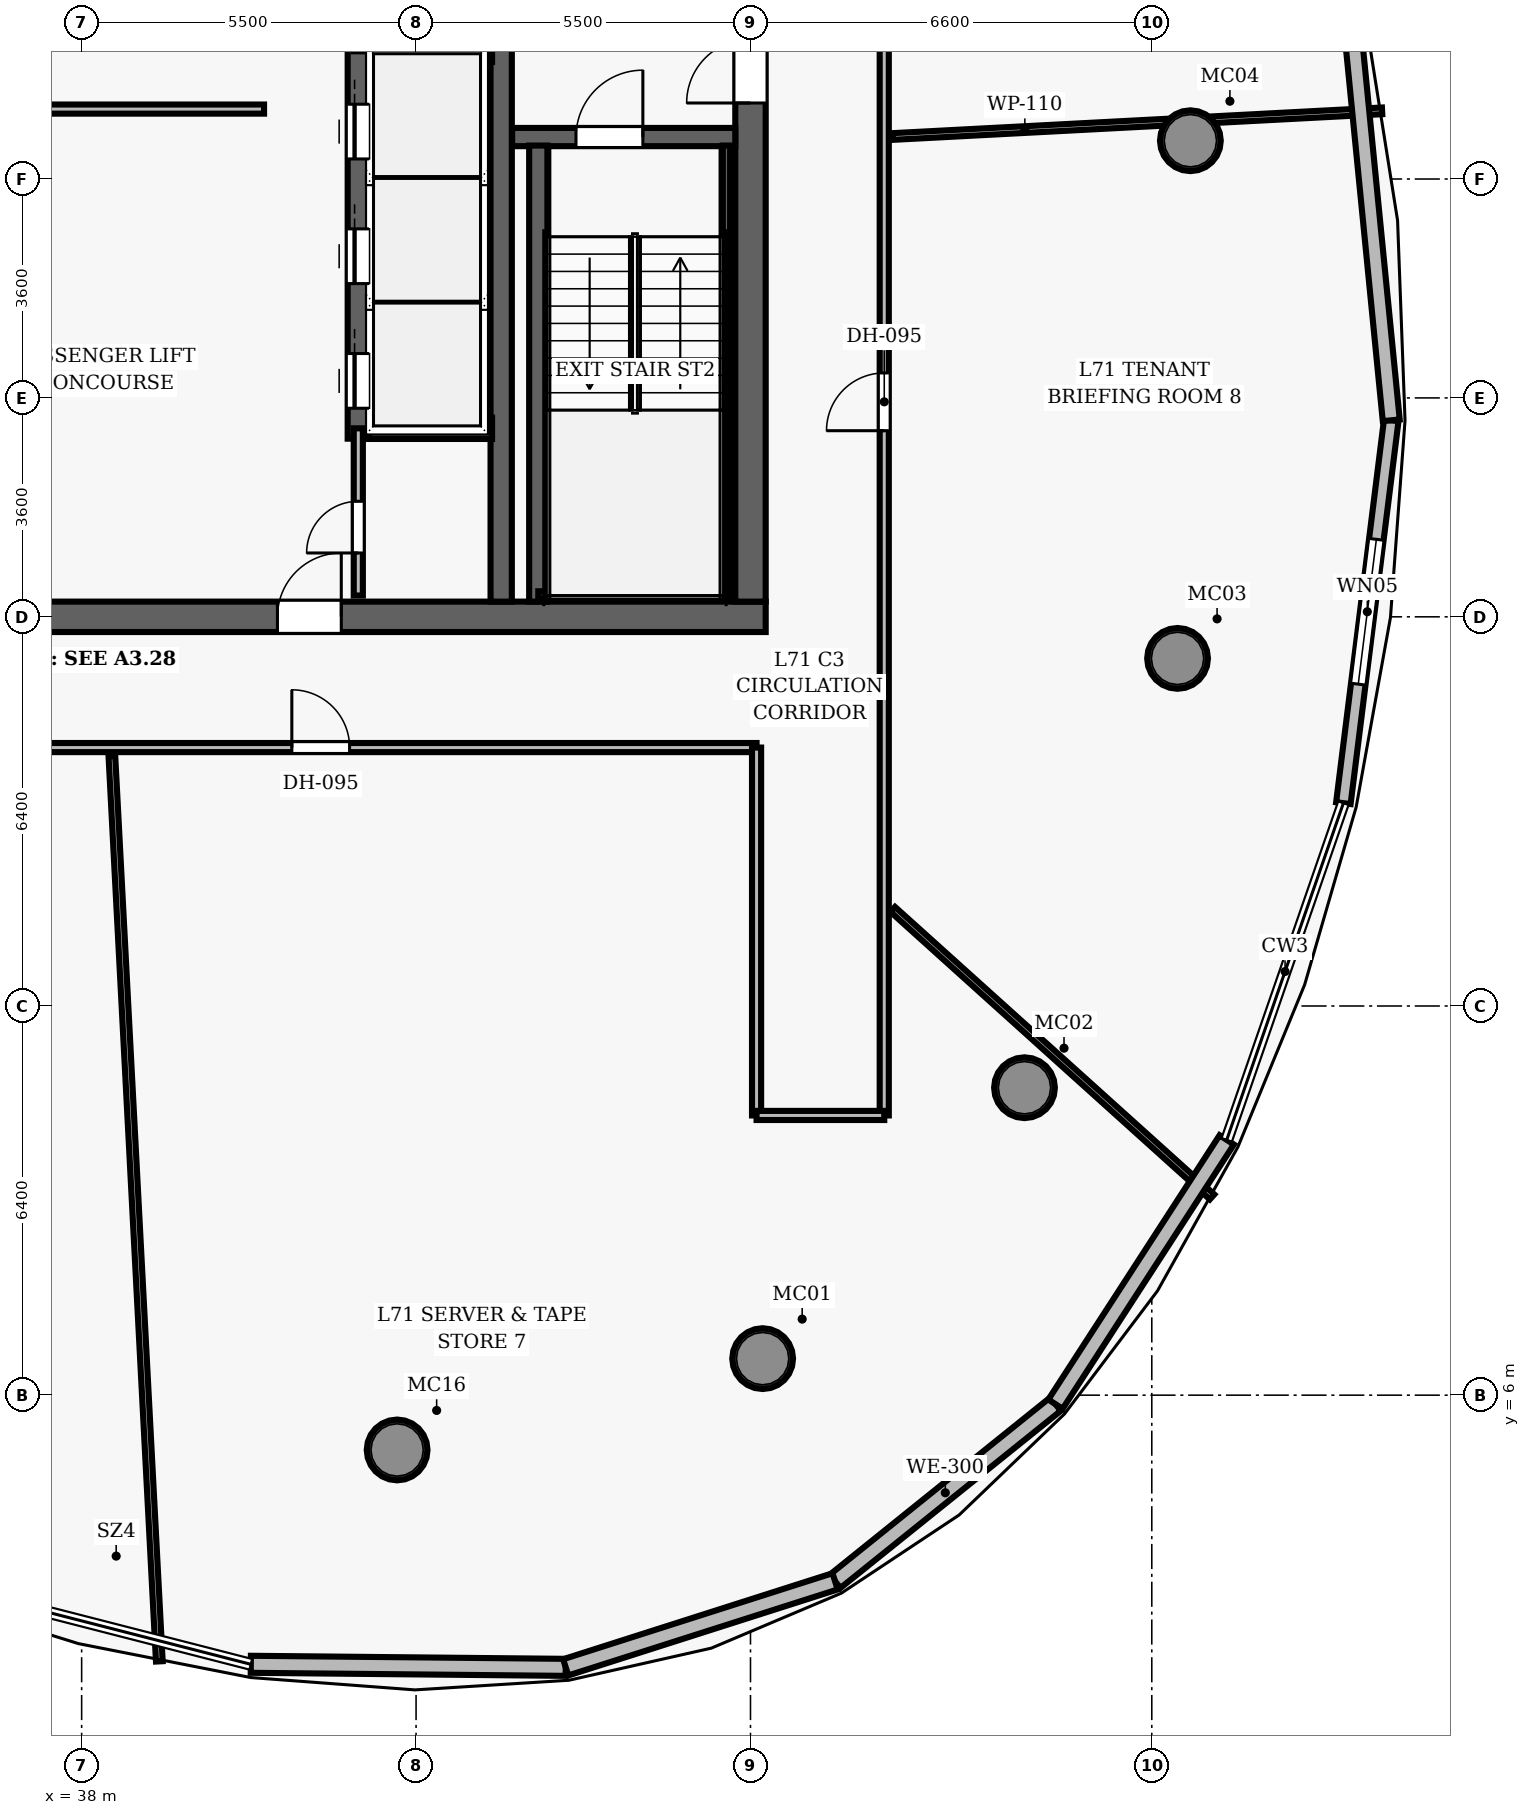
"""IFC4 building model, lengths in metres.
Left out: names, types, materials, properties, quantities, classifications, styles, units other than length and angle.
Written with IfcOpenShell. Run it as: python <this file> out.ifc"""

import sys

from ifc_helpers import new_model, si_unit, direction, frame, frame_2d, origin, origin_2d, place, context, subcontext, project, spatial, rectangle, hollow_circle, extrude, element, fill, save


model = new_model("IFC4")
c1 = context("Model", 3, precision=1e-05, world=origin(), true_north=direction((0.0, 1.0)))
c2 = subcontext(c1, "Body", "Model", "MODEL_VIEW")
j1 = project(units=[si_unit("LENGTHUNIT", "METRE"), si_unit("PLANEANGLEUNIT", "RADIAN")], contexts=[c1])
p1 = place(None, origin())
s1 = spatial("IfcSite", under=j1, at=p1, CompositionType="ELEMENT")
p2 = place(p1, origin())
s2 = spatial("IfcBuilding", under=s1, at=p2, CompositionType="ELEMENT")
p3 = place(p2, frame((0.0, 0.0, 280.55)))
s3 = spatial("IfcBuildingStorey", under=s2, at=p3, CompositionType="ELEMENT", Elevation=280.55)
p4 = place(p3, frame((26.75, 18.8, 0.0), z_axis=(0.0, 0.0, 1.0), x_axis=(1.0, 0.0, 0.0)))
e1 = element("IfcWall", 1, at=p4, inside=s3, PredefinedType="SHEAR", context=c2, shape_type="SweptSolid", body=[
    extrude(rectangle(XDim=22.5, YDim=0.5, at=frame_2d((11.25, 0.0))), origin(), (0.0, 0.0, 1.0), 3.85),
])
p5 = place(p4, frame((14.47, 0.0, 0.0)))
e2 = element("IfcOpeningElement", 2, at=p5, cuts=e1, PredefinedType="OPENING", context=c2, shape_type="SweptSolid", body=[
    extrude(rectangle(XDim=1.05, YDim=2.15, at=frame_2d((0.525, 1.075))), frame((0.0, 0.26, 0.0), z_axis=(0.0, -1.0, 0.0), x_axis=(1.0, 0.0, 0.0)), (0.0, 0.0, 1.0), 0.52),
])
p6 = place(p3, frame((49.0, 19.05, 0.0), z_axis=(0.0, 0.0, 1.0), x_axis=(0.0, 1.0, 0.0)))
e3 = element("IfcWall", 3, at=p6, inside=s3, PredefinedType="SHEAR", context=c2, shape_type="SweptSolid", body=[
    extrude(rectangle(XDim=13.9, YDim=0.5, at=frame_2d((6.95, 0.0))), origin(), (0.0, 0.0, 1.0), 3.85),
])
p7 = place(p6, frame((8.2, 0.0, 0.0)))
e4 = element("IfcOpeningElement", 4, at=p7, cuts=e3, PredefinedType="OPENING", context=c2, shape_type="SweptSolid", body=[
    extrude(rectangle(XDim=1.05, YDim=2.15, at=frame_2d((0.525, 1.075))), frame((0.0, 0.26, 0.0), z_axis=(0.0, -1.0, 0.0), x_axis=(1.0, 0.0, 0.0)), (0.0, 0.0, 1.0), 0.52),
])
p8 = place(p3, frame((44.9, 19.05, 0.0), z_axis=(0.0, 0.0, 1.0), x_axis=(0.0, 1.0, 0.0)))
e5 = element("IfcWall", 5, at=p8, inside=s3, PredefinedType="SHEAR", context=c2, shape_type="SweptSolid", body=[
    extrude(rectangle(XDim=13.9, YDim=0.35, at=frame_2d((6.95, 0.0))), origin(), (0.0, 0.0, 1.0), 3.85),
])
for number, where, z_axis, x_axis in (
    (6, (49.2, 6.601, 0.0), (0.0, 0.0, 1.0), (1.0, 0.0, 0.0)),
    (7, (53.506, 11.056, 0.0), (0.0, 0.0, 1.0), (1.0, 0.0, 0.0)),
    (8, (56.024, 18.116, 0.0), (0.0, 0.0, 1.0), (1.0, 0.0, 0.0)),
    (9, (56.235, 26.629, 0.0), (0.0, 0.0, 1.0), (1.0, 0.0, 0.0)),
    (10, (43.188, 5.099, 0.0), (0.0, 0.0, 1.0), (1.0, 0.0, 0.0)),
):
    element("IfcColumn", number, at=place(p3, frame(where, z_axis=z_axis, x_axis=x_axis)), inside=s3, PredefinedType="COLUMN", context=c2, shape_type="SweptSolid", body=[
        extrude(hollow_circle(Radius=0.5, WallThickness=0.045, at=origin_2d()), origin(), (0.0, 0.0, 1.0), 3.85),
    ])
p9 = place(p3, frame((45.08, 26.69, 0.0), z_axis=(0.0, 0.0, 1.0), x_axis=(1.0, 0.0, 0.0)))
e11 = element("IfcWall", 11, at=p9, inside=s3, PredefinedType="SHEAR", context=c2, shape_type="SweptSolid", body=[
    extrude(rectangle(XDim=3.67, YDim=0.3, at=frame_2d((1.835, 0.0))), origin(), (0.0, 0.0, 1.0), 3.85),
])
p10 = place(p9, frame((1.05, 0.0, 0.0)))
e12 = element("IfcOpeningElement", 12, at=p10, cuts=e11, PredefinedType="OPENING", context=c2, shape_type="SweptSolid", body=[
    extrude(rectangle(XDim=1.1, YDim=2.15, at=frame_2d((0.55, 1.075))), frame((0.0, 0.16, 0.0), z_axis=(0.0, -1.0, 0.0), x_axis=(1.0, 0.0, 0.0)), (0.0, 0.0, 1.0), 0.32),
])
p11 = place(p3, frame((45.51, 19.05, 0.0), z_axis=(0.0, 0.0, 1.0), x_axis=(0.0, 1.0, 0.0)))
e13 = element("IfcWall", 13, at=p11, inside=s3, PredefinedType="SHEAR", context=c2, shape_type="SweptSolid", body=[
    extrude(rectangle(XDim=7.5, YDim=0.3, at=frame_2d((3.75, 0.0))), origin(), (0.0, 0.0, 1.0), 3.85),
])
p12 = place(p3, frame((48.605, 19.1, 0.0), z_axis=(0.0, 0.0, 1.0), x_axis=(0.0, 1.0, 0.0)))
e14 = element("IfcWall", 14, at=p12, inside=s3, PredefinedType="SHEAR", context=c2, shape_type="SweptSolid", body=[
    extrude(rectangle(XDim=7.45, YDim=0.12, at=frame_2d((3.725, 0.0))), origin(), (0.0, 0.0, 1.0), 3.85),
])
p13 = place(p3, frame((45.51, 19.16, 0.0), z_axis=(0.0, 0.0, 1.0), x_axis=(1.0, 0.0, 0.0)))
e15 = element("IfcWall", 15, at=p13, inside=s3, PredefinedType="SHEAR", context=c2, shape_type="SweptSolid", body=[
    extrude(rectangle(XDim=3.095, YDim=0.12, at=frame_2d((1.547, 0.0))), origin(), (0.0, 0.0, 1.0), 3.85),
])
p14 = place(p3, frame((42.55, 21.73, 0.0), z_axis=(0.0, 0.0, 1.0), x_axis=(0.0, 1.0, 0.0)))
e16 = element("IfcWall", 16, at=p14, inside=s3, PredefinedType="SHEAR", context=c2, shape_type="SweptSolid", body=[
    extrude(rectangle(XDim=6.54, YDim=0.35, at=frame_2d((3.27, 0.0))), origin(), (0.0, 0.0, 1.0), 3.04),
])
p15 = place(p14, frame((0.5, 0.0, 0.0)))
e17 = element("IfcOpeningElement", 17, at=p15, cuts=e16, PredefinedType="OPENING", context=c2, shape_type="SweptSolid", body=[
    extrude(rectangle(XDim=0.9, YDim=2.15, at=frame_2d((0.45, 1.075))), frame((0.0, 0.185, 0.0), z_axis=(0.0, -1.0, 0.0), x_axis=(1.0, 0.0, 0.0)), (0.0, 0.0, 1.0), 0.37),
])
p16 = place(p14, frame((2.55, 0.0, 0.0)))
e18 = element("IfcOpeningElement", 18, at=p16, cuts=e16, PredefinedType="OPENING", context=c2, shape_type="SweptSolid", body=[
    extrude(rectangle(XDim=0.9, YDim=2.15, at=frame_2d((0.45, 1.075))), frame((0.0, 0.185, 0.0), z_axis=(0.0, -1.0, 0.0), x_axis=(1.0, 0.0, 0.0)), (0.0, 0.0, 1.0), 0.37),
])
p17 = place(p14, frame((4.6, 0.0, 0.0)))
e19 = element("IfcOpeningElement", 19, at=p17, cuts=e16, PredefinedType="OPENING", context=c2, shape_type="SweptSolid", body=[
    extrude(rectangle(XDim=0.9, YDim=2.15, at=frame_2d((0.45, 1.075))), frame((0.0, 0.185, 0.0), z_axis=(0.0, -1.0, 0.0), x_axis=(1.0, 0.0, 0.0)), (0.0, 0.0, 1.0), 0.37),
])
for number, where, z_axis, x_axis in (
    (20, (42.72, 21.9, 0.0), (0.0, 0.0, 1.0), (1.0, 0.0, 0.0)),
    (21, (42.72, 28.1, 0.0), (0.0, 0.0, 1.0), (1.0, 0.0, 0.0)),
):
    element("IfcWall", number, at=place(p3, frame(where, z_axis=z_axis, x_axis=x_axis)), inside=s3, PredefinedType="SHEAR", context=c2, shape_type="SweptSolid", body=[
        extrude(rectangle(XDim=2.03, YDim=0.35, at=frame_2d((1.015, 0.0))), origin(), (0.0, 0.0, 1.0), 3.04),
    ])
p18 = place(p3, frame((34.64, 27.15, 0.0), z_axis=(0.0, 0.0, 1.0), x_axis=(1.0, 0.0, 0.0)))
e22 = element("IfcWall", 22, at=p18, inside=s3, PredefinedType="PARTITIONING", context=c2, shape_type="SweptSolid", body=[
    extrude(rectangle(XDim=6.36, YDim=0.15, at=frame_2d((3.18, 0.0))), origin(), (0.0, 0.0, 1.0), 3.04),
])
p19 = place(p3, frame((42.55, 19.15, 0.0), z_axis=(0.0, 0.0, 1.0), x_axis=(0.0, 1.0, 0.0)))
e23 = element("IfcWall", 23, at=p19, inside=s3, PredefinedType="PARTITIONING", context=c2, shape_type="SweptSolid", body=[
    extrude(rectangle(XDim=2.75, YDim=0.15, at=frame_2d((1.375, 0.0))), origin(), (0.0, 0.0, 1.0), 3.04),
])
p20 = place(p19, frame((0.7, 0.0, 0.0)))
e24 = element("IfcOpeningElement", 24, at=p20, cuts=e23, PredefinedType="OPENING", context=c2, shape_type="SweptSolid", body=[
    extrude(rectangle(XDim=0.85, YDim=2.1, at=frame_2d((0.425, 1.05))), frame((0.0, 0.085, 0.0), z_axis=(0.0, -1.0, 0.0), x_axis=(1.0, 0.0, 0.0)), (0.0, 0.0, 1.0), 0.17),
])
p21 = place(p3, frame((26.9, 16.65, 0.0), z_axis=(0.0, 0.0, 1.0), x_axis=(1.0, 0.0, 0.0)))
e25 = element("IfcWall", 25, at=p21, inside=s3, PredefinedType="PARTITIONING", context=c2, shape_type="SweptSolid", body=[
    extrude(rectangle(XDim=22.2, YDim=0.15, at=frame_2d((11.1, 0.0))), origin(), (0.0, 0.0, 1.0), 3.04),
])
p22 = place(p21, frame((9.007, 0.0, 0.0)))
e26 = element("IfcOpeningElement", 26, at=p22, cuts=e25, PredefinedType="OPENING", context=c2, shape_type="SweptSolid", body=[
    extrude(rectangle(XDim=0.95, YDim=2.15, at=frame_2d((0.475, 1.075))), frame((0.0, 0.085, 0.0), z_axis=(0.0, -1.0, 0.0), x_axis=(1.0, 0.0, 0.0)), (0.0, 0.0, 1.0), 0.17),
])
p23 = place(p21, frame((14.557, 0.0, 0.0)))
e27 = element("IfcOpeningElement", 27, at=p23, cuts=e25, PredefinedType="OPENING", context=c2, shape_type="SweptSolid", body=[
    extrude(rectangle(XDim=0.95, YDim=2.15, at=frame_2d((0.475, 1.075))), frame((0.0, 0.085, 0.0), z_axis=(0.0, -1.0, 0.0), x_axis=(1.0, 0.0, 0.0)), (0.0, 0.0, 1.0), 0.17),
])
p24 = place(p3, frame((51.2, 10.6, 0.0), z_axis=(0.0, 0.0, 1.0), x_axis=(0.0, 1.0, 0.0)))
e28 = element("IfcWall", 28, at=p24, inside=s3, PredefinedType="PARTITIONING", context=c2, shape_type="SweptSolid", body=[
    extrude(rectangle(XDim=30.173, YDim=0.15, at=frame_2d((15.086, 0.0))), origin(), (0.0, 0.0, 1.0), 3.04),
])
p25 = place(p24, frame((18.645, 0.0, 0.0)))
e29 = element("IfcOpeningElement", 29, at=p25, cuts=e28, PredefinedType="OPENING", context=c2, shape_type="SweptSolid", body=[
    extrude(rectangle(XDim=1.5, YDim=2.2, at=frame_2d((0.75, 1.1))), frame((0.0, 0.085, 0.0), z_axis=(0.0, -1.0, 0.0), x_axis=(1.0, 0.0, 0.0)), (0.0, 0.0, 1.0), 0.17),
])
p26 = place(p24, frame((11.261, 0.0, 0.0)))
e30 = element("IfcOpeningElement", 30, at=p26, cuts=e28, PredefinedType="OPENING", context=c2, shape_type="SweptSolid", body=[
    extrude(rectangle(XDim=0.95, YDim=2.15, at=frame_2d((0.475, 1.075))), frame((0.0, 0.085, 0.0), z_axis=(0.0, -1.0, 0.0), x_axis=(1.0, 0.0, 0.0)), (0.0, 0.0, 1.0), 0.17),
])
p27 = place(p3, frame((49.1, 10.6, 0.0), z_axis=(0.0, 0.0, 1.0), x_axis=(0.0, 1.0, 0.0)))
e31 = element("IfcWall", 31, at=p27, inside=s3, PredefinedType="PARTITIONING", context=c2, shape_type="SweptSolid", body=[
    extrude(rectangle(XDim=6.05, YDim=0.15, at=frame_2d((3.025, 0.0))), origin(), (0.0, 0.0, 1.0), 3.04),
])
p28 = place(p3, frame((49.1, 10.6, 0.0), z_axis=(0.0, 0.0, 1.0), x_axis=(1.0, 0.0, 0.0)))
e32 = element("IfcWall", 32, at=p28, inside=s3, PredefinedType="PARTITIONING", context=c2, shape_type="SweptSolid", body=[
    extrude(rectangle(XDim=2.1, YDim=0.15, at=frame_2d((1.05, 0.0))), origin(), (0.0, 0.0, 1.0), 3.04),
])
p29 = place(p3, frame((51.34, 26.699, 0.0), z_axis=(0.0, 0.0, 1.0), x_axis=(0.998630437158, 0.052318734528, 0.0)))
e33 = element("IfcWall", 33, at=p29, inside=s3, PredefinedType="PARTITIONING", context=c2, shape_type="SweptSolid", body=[
    extrude(rectangle(XDim=8.059, YDim=0.11, at=frame_2d((4.029, 0.0))), origin(), (0.0, 0.0, 1.0), 3.04),
])
p30 = place(p3, frame((38.497, 16.51, 0.0), z_axis=(0.0, 0.0, 1.0), x_axis=(0.052337935775, -0.99862943101, 0.0)))
e34 = element("IfcWall", 34, at=p30, inside=s3, PredefinedType="PARTITIONING", context=c2, shape_type="SweptSolid", body=[
    extrude(rectangle(XDim=14.908, YDim=0.11, at=frame_2d((7.454, 0.0))), origin(), (0.0, 0.0, 1.0), 3.04),
])
p31 = place(p3, frame((51.34, 13.989, 0.0), z_axis=(0.0, 0.0, 1.0), x_axis=(0.74315840834, -0.669115520754, 0.0)))
e35 = element("IfcWall", 35, at=p31, inside=s3, PredefinedType="PARTITIONING", context=c2, shape_type="SweptSolid", body=[
    extrude(rectangle(XDim=7.066, YDim=0.11, at=frame_2d((3.533, 0.0))), origin(), (0.0, 0.0, 1.0), 3.04),
])
p32 = place(p3, frame((54.016, 5.852, 0.0), z_axis=(0.0, 0.0, 1.0), x_axis=(-0.779376173467, -0.626556286564, 0.0)))
e36 = element("IfcWall", 36, at=p32, inside=s3, PredefinedType="SOLIDWALL", context=c2, shape_type="SweptSolid", body=[
    extrude(rectangle(XDim=4.651, YDim=0.28, at=frame_2d((2.325, 0.0))), origin(), (0.0, 0.0, 1.0), 3.625),
])
p33 = place(p3, frame((56.833, 10.198, 0.0), z_axis=(0.0, 0.0, 1.0), x_axis=(-0.543829680386, -0.839195614104, 0.0)))
e37 = element("IfcWall", 37, at=p33, inside=s3, PredefinedType="SOLIDWALL", context=c2, shape_type="SweptSolid", body=[
    extrude(rectangle(XDim=5.179, YDim=0.28, at=frame_2d((2.59, 0.0))), origin(), (0.0, 0.0, 1.0), 3.625),
])
p34 = place(p3, frame((59.538, 22.032, 0.0), z_axis=(0.0, 0.0, 1.0), x_axis=(-0.124124709547, -0.992266625701, 0.0)))
e38 = element("IfcWall", 38, at=p34, inside=s3, PredefinedType="SOLIDWALL", context=c2, shape_type="SweptSolid", body=[
    extrude(rectangle(XDim=6.345, YDim=0.24, at=frame_2d((3.173, 0.0))), origin(), (0.0, 0.0, 1.0), 3.625),
])
p35 = place(p34, frame((1.973, 0.0, 0.85)))
e39 = element("IfcOpeningElement", 39, at=p35, cuts=e38, PredefinedType="OPENING", context=c2, shape_type="SweptSolid", body=[
    extrude(rectangle(XDim=2.4, YDim=2.0, at=frame_2d((1.2, 1.0))), frame((0.0, 0.13, 0.0), z_axis=(0.0, -1.0, 0.0), x_axis=(1.0, 0.0, 0.0)), (0.0, 0.0, 1.0), 0.26),
])
p36 = place(p3, frame((58.896, 28.526, 0.0), z_axis=(0.0, 0.0, 1.0), x_axis=(0.098348049648, -0.995152079398, 0.0)))
e40 = element("IfcWall", 40, at=p36, inside=s3, PredefinedType="SOLIDWALL", context=c2, shape_type="SweptSolid", body=[
    extrude(rectangle(XDim=6.526, YDim=0.28, at=frame_2d((3.263, 0.0))), origin(), (0.0, 0.0, 1.0), 3.625),
])
p37 = place(p3, frame((45.961, 1.524, 0.0), z_axis=(0.0, 0.0, 1.0), x_axis=(-0.999952851319, 0.009710568395, 0.0)))
e41 = element("IfcWall", 41, at=p37, inside=s3, PredefinedType="SOLIDWALL", context=c2, shape_type="SweptSolid", body=[
    extrude(rectangle(XDim=5.179, YDim=0.28, at=frame_2d((2.59, 0.0))), origin(), (0.0, 0.0, 1.0), 3.625),
])
p38 = place(p3, frame((50.392, 2.938, 0.0), z_axis=(0.0, 0.0, 1.0), x_axis=(-0.952637856916, -0.304107075831, 0.0)))
e42 = element("IfcWall", 42, at=p38, inside=s3, PredefinedType="SOLIDWALL", context=c2, shape_type="SweptSolid", body=[
    extrude(rectangle(XDim=4.651, YDim=0.28, at=frame_2d((2.325, 0.0))), origin(), (0.0, 0.0, 1.0), 3.625),
])
p39 = place(p10, origin())
e43 = element("IfcDoor", 43, at=p39, inside=s3, OperationType="SINGLE_SWING_RIGHT", PredefinedType="DOOR", context=c2, shape_type="SweptSolid", body=[
    extrude(rectangle(XDim=1.1, YDim=2.15, at=frame_2d((0.55, 1.075))), frame((0.0, 0.025, 0.0), z_axis=(0.0, -1.0, 0.0), x_axis=(1.0, 0.0, 0.0)), (0.0, 0.0, 1.0), 0.05),
])
fill(e12, e43)
p40 = place(p7, origin())
e44 = element("IfcDoor", 44, at=p40, inside=s3, OperationType="SINGLE_SWING_LEFT", PredefinedType="DOOR", context=c2, shape_type="SweptSolid", body=[
    extrude(rectangle(XDim=1.05, YDim=2.15, at=frame_2d((0.525, 1.075))), frame((0.0, 0.025, 0.0), z_axis=(0.0, -1.0, 0.0), x_axis=(1.0, 0.0, 0.0)), (0.0, 0.0, 1.0), 0.05),
])
fill(e4, e44)
p41 = place(p5, origin())
e45 = element("IfcDoor", 45, at=p41, inside=s3, OperationType="SINGLE_SWING_RIGHT", PredefinedType="DOOR", context=c2, shape_type="SweptSolid", body=[
    extrude(rectangle(XDim=1.05, YDim=2.15, at=frame_2d((0.525, 1.075))), frame((0.0, 0.025, 0.0), z_axis=(0.0, -1.0, 0.0), x_axis=(1.0, 0.0, 0.0)), (0.0, 0.0, 1.0), 0.05),
])
fill(e2, e45)
p42 = place(p20, origin())
e46 = element("IfcDoor", 46, at=p42, inside=s3, OperationType="SINGLE_SWING_LEFT", PredefinedType="DOOR", context=c2, shape_type="SweptSolid", body=[
    extrude(rectangle(XDim=0.85, YDim=2.1, at=frame_2d((0.425, 1.05))), frame((0.0, 0.025, 0.0), z_axis=(0.0, -1.0, 0.0), x_axis=(1.0, 0.0, 0.0)), (0.0, 0.0, 1.0), 0.05),
])
fill(e24, e46)
p43 = place(p23, origin())
e47 = element("IfcDoor", 47, at=p43, inside=s3, OperationType="SINGLE_SWING_LEFT", PredefinedType="DOOR", context=c2, shape_type="SweptSolid", body=[
    extrude(rectangle(XDim=0.95, YDim=2.15, at=frame_2d((0.475, 1.075))), frame((0.0, 0.025, 0.0), z_axis=(0.0, -1.0, 0.0), x_axis=(1.0, 0.0, 0.0)), (0.0, 0.0, 1.0), 0.05),
])
fill(e27, e47)
p44 = place(p26, origin())
e48 = element("IfcDoor", 48, at=p44, inside=s3, OperationType="SINGLE_SWING_LEFT", PredefinedType="DOOR", context=c2, shape_type="SweptSolid", body=[
    extrude(rectangle(XDim=0.95, YDim=2.15, at=frame_2d((0.475, 1.075))), frame((0.0, 0.025, 0.0), z_axis=(0.0, -1.0, 0.0), x_axis=(1.0, 0.0, 0.0)), (0.0, 0.0, 1.0), 0.05),
])
fill(e30, e48)
p45 = place(p15, origin())
e49 = element("IfcDoor", 49, at=p45, inside=s3, OperationType="SLIDING_TO_LEFT", PredefinedType="DOOR", context=c2, shape_type="SweptSolid", body=[
    extrude(rectangle(XDim=0.9, YDim=2.15, at=frame_2d((0.45, 1.075))), frame((0.0, 0.025, 0.0), z_axis=(0.0, -1.0, 0.0), x_axis=(1.0, 0.0, 0.0)), (0.0, 0.0, 1.0), 0.05),
])
fill(e17, e49)
p46 = place(p16, origin())
e50 = element("IfcDoor", 50, at=p46, inside=s3, OperationType="SLIDING_TO_LEFT", PredefinedType="DOOR", context=c2, shape_type="SweptSolid", body=[
    extrude(rectangle(XDim=0.9, YDim=2.15, at=frame_2d((0.45, 1.075))), frame((0.0, 0.025, 0.0), z_axis=(0.0, -1.0, 0.0), x_axis=(1.0, 0.0, 0.0)), (0.0, 0.0, 1.0), 0.05),
])
fill(e18, e50)
p47 = place(p17, origin())
e51 = element("IfcDoor", 51, at=p47, inside=s3, OperationType="SLIDING_TO_LEFT", PredefinedType="DOOR", context=c2, shape_type="SweptSolid", body=[
    extrude(rectangle(XDim=0.9, YDim=2.15, at=frame_2d((0.45, 1.075))), frame((0.0, 0.025, 0.0), z_axis=(0.0, -1.0, 0.0), x_axis=(1.0, 0.0, 0.0)), (0.0, 0.0, 1.0), 0.05),
])
fill(e19, e51)
p48 = place(p35, origin())
e52 = element("IfcWindow", 52, at=p48, inside=s3, PartitioningType="SINGLE_PANEL", PredefinedType="WINDOW", context=c2, shape_type="SweptSolid", body=[
    extrude(rectangle(XDim=2.4, YDim=2.0, at=frame_2d((1.2, 1.0))), frame((0.0, 0.03, 0.0), z_axis=(0.0, -1.0, 0.0), x_axis=(1.0, 0.0, 0.0)), (0.0, 0.0, 1.0), 0.06),
])
fill(e39, e52)
save(model, sys.argv[1])
